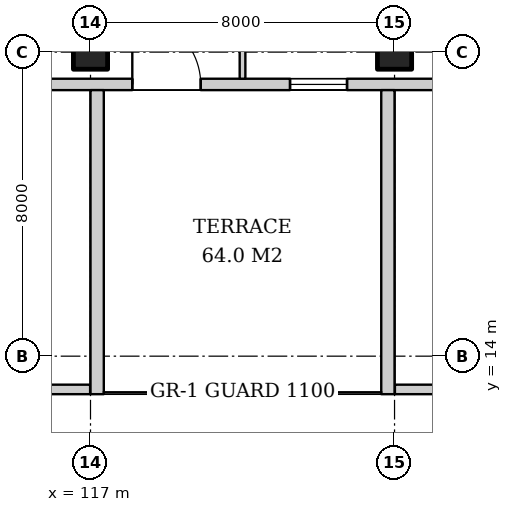
"""IFC4 building model, lengths in metres.
Left out: names, types, materials, properties, quantities, classifications, styles, units other than length and angle.
Written with IfcOpenShell. Run it as: python <this file> out.ifc"""

import sys

from ifc_helpers import new_model, si_unit, direction, frame, frame_2d, origin, origin_2d, place, context, subcontext, project, spatial, rectangle, extrude, element, fill, save


model = new_model("IFC4")
c1 = context("Model", 3, precision=1e-05, world=origin(), true_north=direction((0.0, 1.0)))
c2 = subcontext(c1, "Body", "Model", "MODEL_VIEW")
j1 = project(units=[si_unit("LENGTHUNIT", "METRE"), si_unit("PLANEANGLEUNIT", "RADIAN")], contexts=[c1])
p1 = place(None, origin())
s1 = spatial("IfcSite", under=j1, at=p1, CompositionType="ELEMENT")
p2 = place(p1, origin())
s2 = spatial("IfcBuilding", under=s1, at=p2, CompositionType="ELEMENT")
p3 = place(p2, frame((0.0, 0.0, 11.0)))
s3 = spatial("IfcBuildingStorey", under=s2, at=p3, CompositionType="ELEMENT", Elevation=11.0)
for number, where, z_axis, x_axis in (
    (1, (117.0, 22.0, 0.0), (0.0, 0.0, 1.0), (1.0, 0.0, 0.0)),
    (2, (125.0, 22.0, 0.0), (0.0, 0.0, 1.0), (1.0, 0.0, 0.0)),
):
    element("IfcColumn", number, at=place(p3, frame(where, z_axis=z_axis, x_axis=x_axis)), inside=s3, PredefinedType="COLUMN", context=c2, shape_type="SweptSolid", body=[
        extrude(rectangle(XDim=0.9, YDim=0.9, at=origin_2d()), origin(), (0.0, 0.0, 1.0), 5.0),
    ])
p4 = place(p3, frame((92.0, 21.15, 0.0), z_axis=(0.0, 0.0, 1.0), x_axis=(1.0, 0.0, 0.0)))
e3 = element("IfcWall", 3, at=p4, inside=s3, PredefinedType="SOLIDWALL", context=c2, shape_type="SweptSolid", body=[
    extrude(rectangle(XDim=50.0, YDim=0.3, at=frame_2d((25.0, 0.0))), origin(), (0.0, 0.0, 1.0), 4.7),
])
p5 = place(p4, frame((1.5, 0.0, 0.9)))
e4 = element("IfcOpeningElement", 4, at=p5, cuts=e3, PredefinedType="OPENING", context=c2, shape_type="SweptSolid", body=[
    extrude(rectangle(XDim=1.5, YDim=3.2, at=frame_2d((0.75, 1.6))), frame((0.0, 0.16, 0.0), z_axis=(0.0, -1.0, 0.0), x_axis=(1.0, 0.0, 0.0)), (0.0, 0.0, 1.0), 0.32),
])
p6 = place(p4, frame((6.0, 0.0, 0.9)))
e5 = element("IfcOpeningElement", 5, at=p6, cuts=e3, PredefinedType="OPENING", context=c2, shape_type="SweptSolid", body=[
    extrude(rectangle(XDim=1.5, YDim=3.2, at=frame_2d((0.75, 1.6))), frame((0.0, 0.16, 0.0), z_axis=(0.0, -1.0, 0.0), x_axis=(1.0, 0.0, 0.0)), (0.0, 0.0, 1.0), 0.32),
])
p7 = place(p4, frame((10.25, 0.0, 0.9)))
e6 = element("IfcOpeningElement", 6, at=p7, cuts=e3, PredefinedType="OPENING", context=c2, shape_type="SweptSolid", body=[
    extrude(rectangle(XDim=1.5, YDim=3.2, at=frame_2d((0.75, 1.6))), frame((0.0, 0.16, 0.0), z_axis=(0.0, -1.0, 0.0), x_axis=(1.0, 0.0, 0.0)), (0.0, 0.0, 1.0), 0.32),
])
p8 = place(p4, frame((14.25, 0.0, 0.9)))
e7 = element("IfcOpeningElement", 7, at=p8, cuts=e3, PredefinedType="OPENING", context=c2, shape_type="SweptSolid", body=[
    extrude(rectangle(XDim=1.5, YDim=3.2, at=frame_2d((0.75, 1.6))), frame((0.0, 0.16, 0.0), z_axis=(0.0, -1.0, 0.0), x_axis=(1.0, 0.0, 0.0)), (0.0, 0.0, 1.0), 0.32),
])
p9 = place(p4, frame((18.25, 0.0, 0.9)))
e8 = element("IfcOpeningElement", 8, at=p9, cuts=e3, PredefinedType="OPENING", context=c2, shape_type="SweptSolid", body=[
    extrude(rectangle(XDim=1.5, YDim=3.2, at=frame_2d((0.75, 1.6))), frame((0.0, 0.16, 0.0), z_axis=(0.0, -1.0, 0.0), x_axis=(1.0, 0.0, 0.0)), (0.0, 0.0, 1.0), 0.32),
])
p10 = place(p4, frame((22.25, 0.0, 0.9)))
e9 = element("IfcOpeningElement", 9, at=p10, cuts=e3, PredefinedType="OPENING", context=c2, shape_type="SweptSolid", body=[
    extrude(rectangle(XDim=1.5, YDim=3.2, at=frame_2d((0.75, 1.6))), frame((0.0, 0.16, 0.0), z_axis=(0.0, -1.0, 0.0), x_axis=(1.0, 0.0, 0.0)), (0.0, 0.0, 1.0), 0.32),
])
p11 = place(p4, frame((26.1, 0.0, 0.0)))
e10 = element("IfcOpeningElement", 10, at=p11, cuts=e3, PredefinedType="OPENING", context=c2, shape_type="SweptSolid", body=[
    extrude(rectangle(XDim=1.8, YDim=2.4, at=frame_2d((0.9, 1.2))), frame((0.0, 0.16, 0.0), z_axis=(0.0, -1.0, 0.0), x_axis=(1.0, 0.0, 0.0)), (0.0, 0.0, 1.0), 0.32),
])
p12 = place(p4, frame((30.25, 0.0, 0.9)))
e11 = element("IfcOpeningElement", 11, at=p12, cuts=e3, PredefinedType="OPENING", context=c2, shape_type="SweptSolid", body=[
    extrude(rectangle(XDim=1.5, YDim=3.2, at=frame_2d((0.75, 1.6))), frame((0.0, 0.16, 0.0), z_axis=(0.0, -1.0, 0.0), x_axis=(1.0, 0.0, 0.0)), (0.0, 0.0, 1.0), 0.32),
])
p13 = place(p4, frame((34.25, 0.0, 0.9)))
e12 = element("IfcOpeningElement", 12, at=p13, cuts=e3, PredefinedType="OPENING", context=c2, shape_type="SweptSolid", body=[
    extrude(rectangle(XDim=1.5, YDim=3.2, at=frame_2d((0.75, 1.6))), frame((0.0, 0.16, 0.0), z_axis=(0.0, -1.0, 0.0), x_axis=(1.0, 0.0, 0.0)), (0.0, 0.0, 1.0), 0.32),
])
p14 = place(p4, frame((38.25, 0.0, 0.9)))
e13 = element("IfcOpeningElement", 13, at=p14, cuts=e3, PredefinedType="OPENING", context=c2, shape_type="SweptSolid", body=[
    extrude(rectangle(XDim=1.5, YDim=3.2, at=frame_2d((0.75, 1.6))), frame((0.0, 0.16, 0.0), z_axis=(0.0, -1.0, 0.0), x_axis=(1.0, 0.0, 0.0)), (0.0, 0.0, 1.0), 0.32),
])
p15 = place(p4, frame((42.5, 0.0, 0.9)))
e14 = element("IfcOpeningElement", 14, at=p15, cuts=e3, PredefinedType="OPENING", context=c2, shape_type="SweptSolid", body=[
    extrude(rectangle(XDim=1.5, YDim=3.2, at=frame_2d((0.75, 1.6))), frame((0.0, 0.16, 0.0), z_axis=(0.0, -1.0, 0.0), x_axis=(1.0, 0.0, 0.0)), (0.0, 0.0, 1.0), 0.32),
])
p16 = place(p4, frame((47.0, 0.0, 0.9)))
e15 = element("IfcOpeningElement", 15, at=p16, cuts=e3, PredefinedType="OPENING", context=c2, shape_type="SweptSolid", body=[
    extrude(rectangle(XDim=1.5, YDim=3.2, at=frame_2d((0.75, 1.6))), frame((0.0, 0.16, 0.0), z_axis=(0.0, -1.0, 0.0), x_axis=(1.0, 0.0, 0.0)), (0.0, 0.0, 1.0), 0.32),
])
p17 = place(p3, frame((92.0, 13.125, 0.0), z_axis=(0.0, 0.0, 1.0), x_axis=(1.0, 0.0, 0.0)))
e16 = element("IfcWall", 16, at=p17, inside=s3, PredefinedType="PARAPET", context=c2, shape_type="SweptSolid", body=[
    extrude(rectangle(XDim=24.99, YDim=0.25, at=frame_2d((12.495, 0.0))), origin(), (0.0, 0.0, 1.0), 1.1),
])
p18 = place(p3, frame((125.01, 13.125, 0.0), z_axis=(0.0, 0.0, 1.0), x_axis=(1.0, 0.0, 0.0)))
e17 = element("IfcWall", 17, at=p18, inside=s3, PredefinedType="PARAPET", context=c2, shape_type="SweptSolid", body=[
    extrude(rectangle(XDim=16.99, YDim=0.25, at=frame_2d((8.495, 0.0))), origin(), (0.0, 0.0, 1.0), 1.1),
])
for number, where, z_axis, x_axis in (
    (18, (117.175, 13.0, 0.0), (0.0, 0.0, 1.0), (0.0, 1.0, 0.0)),
    (19, (124.825, 13.0, 0.0), (0.0, 0.0, 1.0), (0.0, 1.0, 0.0)),
):
    element("IfcWall", number, at=place(p3, frame(where, z_axis=z_axis, x_axis=x_axis)), inside=s3, PredefinedType="PARAPET", context=c2, shape_type="SweptSolid", body=[
        extrude(rectangle(XDim=8.0, YDim=0.35, at=frame_2d((4.0, 0.0))), origin(), (0.0, 0.0, 1.0), 1.1),
    ])
p19 = place(p3, frame((121.0, 21.3, 0.0), z_axis=(0.0, 0.0, 1.0), x_axis=(0.0, 1.0, 0.0)))
e20 = element("IfcWall", 20, at=p19, inside=s3, PredefinedType="PARTITIONING", context=c2, shape_type="SweptSolid", body=[
    extrude(rectangle(XDim=13.425, YDim=0.15, at=frame_2d((6.712, 0.0))), origin(), (0.0, 0.0, 1.0), 4.15),
])
p20 = place(p11, origin())
e21 = element("IfcDoor", 21, at=p20, inside=s3, OperationType="DOUBLE_DOOR_SINGLE_SWING", PredefinedType="DOOR", context=c2, shape_type="SweptSolid", body=[
    extrude(rectangle(XDim=1.8, YDim=2.4, at=frame_2d((0.9, 1.2))), frame((0.0, 0.025, 0.0), z_axis=(0.0, -1.0, 0.0), x_axis=(1.0, 0.0, 0.0)), (0.0, 0.0, 1.0), 0.05),
])
fill(e10, e21)
p21 = place(p12, origin())
e22 = element("IfcWindow", 22, at=p21, inside=s3, PartitioningType="SINGLE_PANEL", PredefinedType="WINDOW", context=c2, shape_type="SweptSolid", body=[
    extrude(rectangle(XDim=1.5, YDim=3.2, at=frame_2d((0.75, 1.6))), frame((0.0, 0.03, 0.0), z_axis=(0.0, -1.0, 0.0), x_axis=(1.0, 0.0, 0.0)), (0.0, 0.0, 1.0), 0.06),
])
fill(e11, e22)
save(model, sys.argv[1])
